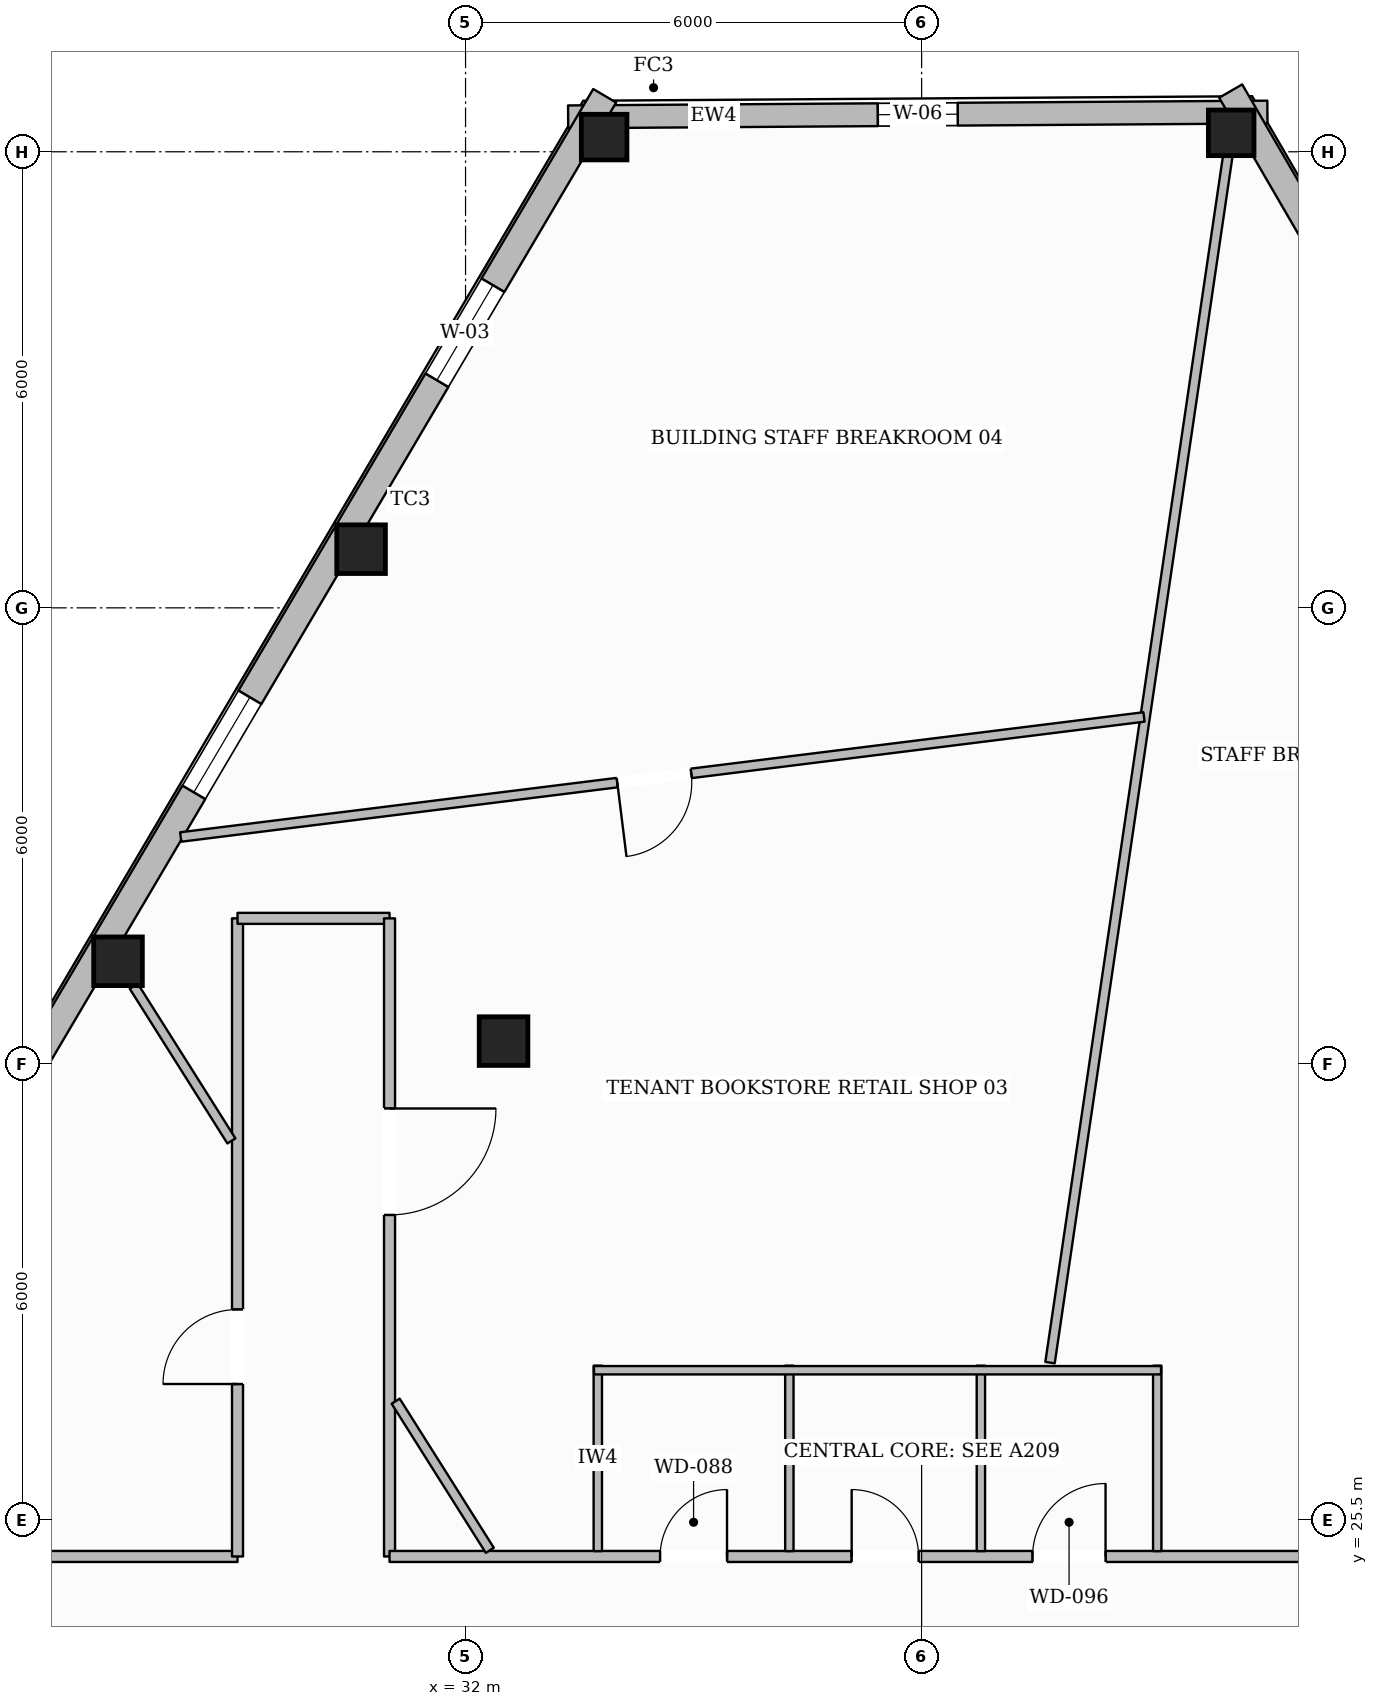
"""IFC4 building model, lengths in metres.
Left out: names, types, materials, properties, quantities, classifications, styles, units other than length and angle.
Written with IfcOpenShell. Run it as: python <this file> out.ifc"""

import sys

from ifc_helpers import new_model, si_unit, direction, frame, frame_2d, origin, origin_2d, place, context, subcontext, project, spatial, rectangle, hollow_rectangle, extrude, element, fill, save


model = new_model("IFC4")
c1 = context("Model", 3, precision=1e-05, world=origin(), true_north=direction((0.0, 1.0)))
c2 = subcontext(c1, "Body", "Model", "MODEL_VIEW")
j1 = project(units=[si_unit("LENGTHUNIT", "METRE"), si_unit("PLANEANGLEUNIT", "RADIAN")], contexts=[c1])
p1 = place(None, origin())
s1 = spatial("IfcSite", under=j1, at=p1, CompositionType="ELEMENT")
p2 = place(p1, origin())
s2 = spatial("IfcBuilding", under=s1, at=p2, CompositionType="ELEMENT")
p3 = place(p2, frame((0.0, 0.0, 211.2)))
s3 = spatial("IfcBuildingStorey", under=s2, at=p3, CompositionType="ELEMENT", Elevation=211.2)
p4 = place(p3, frame((33.823, 43.693, 0.0), z_axis=(0.0, 0.0, 1.0), x_axis=(1.0, 0.0, 0.0)))
e1 = element("IfcColumn", 1, at=p4, inside=s3, PredefinedType="COLUMN", context=c2, shape_type="SweptSolid", body=[
    extrude(hollow_rectangle(XDim=0.6, YDim=0.6, WallThickness=0.028, at=origin_2d()), origin(), (0.0, 0.0, 1.0), 3.6),
])
for number, where, z_axis, x_axis in (
    (2, (30.625, 38.272, 0.0), (0.0, 0.0, 1.0), (1.0, 0.0, 0.0)),
    (3, (27.428, 32.85, 0.0), (0.0, 0.0, 1.0), (1.0, 0.0, 0.0)),
):
    element("IfcColumn", number, at=place(p3, frame(where, z_axis=z_axis, x_axis=x_axis)), inside=s3, PredefinedType="COLUMN", context=c2, shape_type="SweptSolid", body=[
        extrude(hollow_rectangle(XDim=0.64, YDim=0.64, WallThickness=0.028, at=origin_2d()), origin(), (0.0, 0.0, 1.0), 3.6),
    ])
p5 = place(p3, frame((42.073, 43.749, 0.0), z_axis=(0.0, 0.0, 1.0), x_axis=(1.0, 0.0, 0.0)))
e4 = element("IfcColumn", 4, at=p5, inside=s3, PredefinedType="COLUMN", context=c2, shape_type="SweptSolid", body=[
    extrude(hollow_rectangle(XDim=0.6, YDim=0.6, WallThickness=0.028, at=origin_2d()), origin(), (0.0, 0.0, 1.0), 3.6),
])
p6 = place(p3, frame((32.5, 31.8, 0.0), z_axis=(0.0, 0.0, 1.0), x_axis=(1.0, 0.0, 0.0)))
e5 = element("IfcColumn", 5, at=p6, inside=s3, PredefinedType="COLUMN", context=c2, shape_type="SweptSolid", body=[
    extrude(hollow_rectangle(XDim=0.64, YDim=0.64, WallThickness=0.028, at=origin_2d()), origin(), (0.0, 0.0, 1.0), 3.6),
])
p7 = place(p3, frame((33.35, 43.96, 0.0), z_axis=(0.0, 0.0, 1.0), x_axis=(0.99997674426, 0.006819892877, 0.0)))
e6 = element("IfcWall", 6, at=p7, inside=s3, PredefinedType="STANDARD", context=c2, shape_type="SweptSolid", body=[
    extrude(rectangle(XDim=9.2, YDim=0.3, at=frame_2d((4.6, 0.0))), origin(), (0.0, 0.0, 1.0), 3.132),
])
p8 = place(p7, frame((4.075, 0.0, 0.65)))
e7 = element("IfcOpeningElement", 7, at=p8, cuts=e6, PredefinedType="OPENING", context=c2, shape_type="SweptSolid", body=[
    extrude(rectangle(XDim=1.05, YDim=1.7, at=frame_2d((0.525, 0.85))), frame((0.0, 0.16, 0.0), z_axis=(0.0, -1.0, 0.0), x_axis=(1.0, 0.0, 0.0)), (0.0, 0.0, 1.0), 0.32),
])
p9 = place(p3, frame((14.16, 10.888, 0.0), z_axis=(0.0, 0.0, 1.0), x_axis=(0.508058913236, 0.861322321017, 0.0)))
e8 = element("IfcWall", 8, at=p9, inside=s3, PredefinedType="STANDARD", context=c2, shape_type="SweptSolid", body=[
    extrude(rectangle(XDim=38.718, YDim=0.35, at=frame_2d((19.359, 0.0))), origin(), (0.0, 0.0, 1.0), 3.132),
])
p10 = place(p9, frame((34.374, 0.0, 0.65)))
e9 = element("IfcOpeningElement", 9, at=p10, cuts=e8, PredefinedType="OPENING", context=c2, shape_type="SweptSolid", body=[
    extrude(rectangle(XDim=1.45, YDim=1.75, at=frame_2d((0.725, 0.875))), frame((0.0, 0.185, 0.0), z_axis=(0.0, -1.0, 0.0), x_axis=(1.0, 0.0, 0.0)), (0.0, 0.0, 1.0), 0.37),
])
p11 = place(p9, frame((28.08, 0.0, 0.65)))
e10 = element("IfcOpeningElement", 10, at=p11, cuts=e8, PredefinedType="OPENING", context=c2, shape_type="SweptSolid", body=[
    extrude(rectangle(XDim=1.45, YDim=1.75, at=frame_2d((0.725, 0.875))), frame((0.0, 0.185, 0.0), z_axis=(0.0, -1.0, 0.0), x_axis=(1.0, 0.0, 0.0)), (0.0, 0.0, 1.0), 0.37),
])
p12 = place(p9, frame((15.491, 0.0, 0.65)))
e11 = element("IfcOpeningElement", 11, at=p12, cuts=e8, PredefinedType="OPENING", context=c2, shape_type="SweptSolid", body=[
    extrude(rectangle(XDim=1.45, YDim=1.75, at=frame_2d((0.725, 0.875))), frame((0.0, 0.185, 0.0), z_axis=(0.0, -1.0, 0.0), x_axis=(1.0, 0.0, 0.0)), (0.0, 0.0, 1.0), 0.37),
])
p13 = place(p9, frame((9.197, 0.0, 0.65)))
e12 = element("IfcOpeningElement", 12, at=p13, cuts=e8, PredefinedType="OPENING", context=c2, shape_type="SweptSolid", body=[
    extrude(rectangle(XDim=1.45, YDim=1.75, at=frame_2d((0.725, 0.875))), frame((0.0, 0.185, 0.0), z_axis=(0.0, -1.0, 0.0), x_axis=(1.0, 0.0, 0.0)), (0.0, 0.0, 1.0), 0.37),
])
p14 = place(p9, frame((2.903, 0.0, 0.65)))
e13 = element("IfcOpeningElement", 13, at=p14, cuts=e8, PredefinedType="OPENING", context=c2, shape_type="SweptSolid", body=[
    extrude(rectangle(XDim=1.45, YDim=1.75, at=frame_2d((0.725, 0.875))), frame((0.0, 0.185, 0.0), z_axis=(0.0, -1.0, 0.0), x_axis=(1.0, 0.0, 0.0)), (0.0, 0.0, 1.0), 0.37),
])
p15 = place(p3, frame((42.066, 44.299, 0.0), z_axis=(0.0, 0.0, 1.0), x_axis=(0.502188775534, -0.864758020331, 0.0)))
e14 = element("IfcWall", 14, at=p15, inside=s3, PredefinedType="STANDARD", context=c2, shape_type="SweptSolid", body=[
    extrude(rectangle(XDim=38.263, YDim=0.35, at=frame_2d((19.132, 0.0))), origin(), (0.0, 0.0, 1.0), 3.132),
])
p16 = place(p15, frame((33.948, 0.0, 0.65)))
e15 = element("IfcOpeningElement", 15, at=p16, cuts=e14, PredefinedType="OPENING", context=c2, shape_type="SweptSolid", body=[
    extrude(rectangle(XDim=1.45, YDim=1.75, at=frame_2d((0.725, 0.875))), frame((0.0, 0.185, 0.0), z_axis=(0.0, -1.0, 0.0), x_axis=(1.0, 0.0, 0.0)), (0.0, 0.0, 1.0), 0.37),
])
p17 = place(p15, frame((27.731, 0.0, 0.65)))
e16 = element("IfcOpeningElement", 16, at=p17, cuts=e14, PredefinedType="OPENING", context=c2, shape_type="SweptSolid", body=[
    extrude(rectangle(XDim=1.45, YDim=1.75, at=frame_2d((0.725, 0.875))), frame((0.0, 0.185, 0.0), z_axis=(0.0, -1.0, 0.0), x_axis=(1.0, 0.0, 0.0)), (0.0, 0.0, 1.0), 0.37),
])
p18 = place(p15, frame((15.297, 0.0, 0.65)))
e17 = element("IfcOpeningElement", 17, at=p18, cuts=e14, PredefinedType="OPENING", context=c2, shape_type="SweptSolid", body=[
    extrude(rectangle(XDim=1.45, YDim=1.75, at=frame_2d((0.725, 0.875))), frame((0.0, 0.185, 0.0), z_axis=(0.0, -1.0, 0.0), x_axis=(1.0, 0.0, 0.0)), (0.0, 0.0, 1.0), 0.37),
])
p19 = place(p15, frame((9.079, 0.0, 0.65)))
e18 = element("IfcOpeningElement", 18, at=p19, cuts=e14, PredefinedType="OPENING", context=c2, shape_type="SweptSolid", body=[
    extrude(rectangle(XDim=1.45, YDim=1.75, at=frame_2d((0.725, 0.875))), frame((0.0, 0.185, 0.0), z_axis=(0.0, -1.0, 0.0), x_axis=(1.0, 0.0, 0.0)), (0.0, 0.0, 1.0), 0.37),
])
p20 = place(p15, frame((2.862, 0.0, 0.65)))
e19 = element("IfcOpeningElement", 19, at=p20, cuts=e14, PredefinedType="OPENING", context=c2, shape_type="SweptSolid", body=[
    extrude(rectangle(XDim=1.45, YDim=1.75, at=frame_2d((0.725, 0.875))), frame((0.0, 0.185, 0.0), z_axis=(0.0, -1.0, 0.0), x_axis=(1.0, 0.0, 0.0)), (0.0, 0.0, 1.0), 0.37),
])
p21 = place(p3, frame((26.06, 25.02, 0.0), z_axis=(0.0, 0.0, 1.0), x_axis=(1.0, 0.0, 0.0)))
e20 = element("IfcWall", 20, at=p21, inside=s3, PredefinedType="PARTITIONING", context=c2, shape_type="SweptSolid", body=[
    extrude(rectangle(XDim=2.94, YDim=0.145, at=frame_2d((1.47, 0.0))), origin(), (0.0, 0.0, 1.0), 3.6),
])
p22 = place(p3, frame((29.0, 25.02, 0.0), z_axis=(0.0, 0.0, 1.0), x_axis=(0.0, 1.0, 0.0)))
e21 = element("IfcWall", 21, at=p22, inside=s3, PredefinedType="PARTITIONING", context=c2, shape_type="SweptSolid", body=[
    extrude(rectangle(XDim=8.395, YDim=0.145, at=frame_2d((4.197, 0.0))), origin(), (0.0, 0.0, 1.0), 3.6),
])
p23 = place(p22, frame((2.269, 0.0, 0.0)))
e22 = element("IfcOpeningElement", 22, at=p23, cuts=e21, PredefinedType="OPENING", context=c2, shape_type="SweptSolid", body=[
    extrude(rectangle(XDim=0.98, YDim=2.15, at=frame_2d((0.49, 1.075))), frame((0.0, 0.083, 0.0), z_axis=(0.0, -1.0, 0.0), x_axis=(1.0, 0.0, 0.0)), (0.0, 0.0, 1.0), 0.165),
])
p24 = place(p3, frame((29.0, 33.415, 0.0), z_axis=(0.0, 0.0, 1.0), x_axis=(1.0, 0.0, 0.0)))
e23 = element("IfcWall", 23, at=p24, inside=s3, PredefinedType="PARTITIONING", context=c2, shape_type="SweptSolid", body=[
    extrude(rectangle(XDim=2.0, YDim=0.145, at=frame_2d((1.0, 0.0))), origin(), (0.0, 0.0, 1.0), 3.6),
])
p25 = place(p3, frame((31.0, 33.415, 0.0), z_axis=(0.0, 0.0, 1.0), x_axis=(0.0, -1.0, 0.0)))
e24 = element("IfcWall", 24, at=p25, inside=s3, PredefinedType="PARTITIONING", context=c2, shape_type="SweptSolid", body=[
    extrude(rectangle(XDim=8.395, YDim=0.145, at=frame_2d((4.197, 0.0))), origin(), (0.0, 0.0, 1.0), 3.6),
])
p26 = place(p25, frame((2.501, 0.0, 0.0)))
e25 = element("IfcOpeningElement", 25, at=p26, cuts=e24, PredefinedType="OPENING", context=c2, shape_type="SweptSolid", body=[
    extrude(rectangle(XDim=1.4, YDim=2.2, at=frame_2d((0.7, 1.1))), frame((0.0, 0.083, 0.0), z_axis=(0.0, -1.0, 0.0), x_axis=(1.0, 0.0, 0.0)), (0.0, 0.0, 1.0), 0.165),
])
p27 = place(p3, frame((31.0, 25.02, 0.0), z_axis=(0.0, 0.0, 1.0), x_axis=(1.0, 0.0, 0.0)))
e26 = element("IfcWall", 26, at=p27, inside=s3, PredefinedType="PARTITIONING", context=c2, shape_type="SweptSolid", body=[
    extrude(rectangle(XDim=14.0, YDim=0.145, at=frame_2d((7.0, 0.0))), origin(), (0.0, 0.0, 1.0), 3.6),
])
p28 = place(p27, frame((3.56, 0.0, 0.0)))
e27 = element("IfcOpeningElement", 27, at=p28, cuts=e26, PredefinedType="OPENING", context=c2, shape_type="SweptSolid", body=[
    extrude(rectangle(XDim=0.88, YDim=2.1, at=frame_2d((0.44, 1.05))), frame((0.0, 0.083, 0.0), z_axis=(0.0, -1.0, 0.0), x_axis=(1.0, 0.0, 0.0)), (0.0, 0.0, 1.0), 0.165),
])
p29 = place(p27, frame((6.08, 0.0, 0.0)))
e28 = element("IfcOpeningElement", 28, at=p29, cuts=e26, PredefinedType="OPENING", context=c2, shape_type="SweptSolid", body=[
    extrude(rectangle(XDim=0.88, YDim=2.1, at=frame_2d((0.44, 1.05))), frame((0.0, 0.083, 0.0), z_axis=(0.0, -1.0, 0.0), x_axis=(1.0, 0.0, 0.0)), (0.0, 0.0, 1.0), 0.165),
])
p30 = place(p27, frame((8.46, 0.0, 0.0)))
e29 = element("IfcOpeningElement", 29, at=p30, cuts=e26, PredefinedType="OPENING", context=c2, shape_type="SweptSolid", body=[
    extrude(rectangle(XDim=0.96, YDim=2.1, at=frame_2d((0.48, 1.05))), frame((0.0, 0.083, 0.0), z_axis=(0.0, -1.0, 0.0), x_axis=(1.0, 0.0, 0.0)), (0.0, 0.0, 1.0), 0.165),
])
p31 = place(p3, frame((33.74, 25.09, 0.0), z_axis=(0.0, 0.0, 1.0), x_axis=(0.0, 1.0, 0.0)))
e30 = element("IfcWall", 30, at=p31, inside=s3, PredefinedType="PLUMBINGWALL", context=c2, shape_type="SweptSolid", body=[
    extrude(rectangle(XDim=2.44, YDim=0.11, at=frame_2d((1.22, 0.0))), origin(), (0.0, 0.0, 1.0), 3.141),
])
for number, where, z_axis, x_axis in (
    (31, (36.26, 25.09, 0.0), (0.0, 0.0, 1.0), (0.0, 1.0, 0.0)),
    (32, (38.78, 25.09, 0.0), (0.0, 0.0, 1.0), (0.0, 1.0, 0.0)),
    (33, (41.1, 25.09, 0.0), (0.0, 0.0, 1.0), (0.0, 1.0, 0.0)),
):
    element("IfcWall", number, at=place(p3, frame(where, z_axis=z_axis, x_axis=x_axis)), inside=s3, PredefinedType="PLUMBINGWALL", context=c2, shape_type="SweptSolid", body=[
        extrude(rectangle(XDim=2.44, YDim=0.11, at=frame_2d((1.22, 0.0))), origin(), (0.0, 0.0, 1.0), 3.6),
    ])
p32 = place(p3, frame((33.69, 27.47, 0.0), z_axis=(0.0, 0.0, 1.0), x_axis=(1.0, 0.0, 0.0)))
e34 = element("IfcWall", 34, at=p32, inside=s3, PredefinedType="PLUMBINGWALL", context=c2, shape_type="SweptSolid", body=[
    extrude(rectangle(XDim=7.46, YDim=0.11, at=frame_2d((3.73, 0.0))), origin(), (0.0, 0.0, 1.0), 3.6),
])
p33 = place(p3, frame((39.69, 27.57, 0.0), z_axis=(0.0, 0.0, 1.0), x_axis=(0.145732327781, 0.989324056434, 0.0)))
e35 = element("IfcWall", 35, at=p33, inside=s3, PredefinedType="PARTITIONING", context=c2, shape_type="SweptSolid", body=[
    extrude(rectangle(XDim=16.042, YDim=0.125, at=frame_2d((8.021, 0.0))), origin(), (0.0, 0.0, 1.0), 3.141),
])
p34 = place(p3, frame((32.319, 25.101, 0.0), z_axis=(0.0, 0.0, 1.0), x_axis=(-0.533719839568, 0.845661358259, 0.0)))
e36 = element("IfcWall", 36, at=p34, inside=s3, PredefinedType="PARTITIONING", context=c2, shape_type="SweptSolid", body=[
    extrude(rectangle(XDim=2.321, YDim=0.125, at=frame_2d((1.16, 0.0))), origin(), (0.0, 0.0, 1.0), 3.6),
])
p35 = place(p3, frame((28.919, 30.487, 0.0), z_axis=(0.0, 0.0, 1.0), x_axis=(-0.533741092176, 0.845647944787, 0.0)))
e37 = element("IfcWall", 37, at=p35, inside=s3, PredefinedType="PARTITIONING", context=c2, shape_type="SweptSolid", body=[
    extrude(rectangle(XDim=2.407, YDim=0.125, at=frame_2d((1.204, 0.0))), origin(), (0.0, 0.0, 1.0), 3.6),
])
p36 = place(p3, frame((40.926, 36.064, 0.0), z_axis=(0.0, 0.0, 1.0), x_axis=(-0.992323981917, -0.123665334316, 0.0)))
e38 = element("IfcWall", 38, at=p36, inside=s3, PredefinedType="PARTITIONING", context=c2, shape_type="SweptSolid", body=[
    extrude(rectangle(XDim=12.771, YDim=0.125, at=frame_2d((6.386, 0.0))), origin(), (0.0, 0.0, 1.0), 3.6),
])
p37 = place(p36, frame((6.003, 0.0, 0.0)))
e39 = element("IfcOpeningElement", 39, at=p37, cuts=e38, PredefinedType="OPENING", context=c2, shape_type="SweptSolid", body=[
    extrude(rectangle(XDim=0.98, YDim=2.15, at=frame_2d((0.49, 1.075))), frame((0.0, 0.073, 0.0), z_axis=(0.0, -1.0, 0.0), x_axis=(1.0, 0.0, 0.0)), (0.0, 0.0, 1.0), 0.145),
])
p38 = place(p10, origin())
e40 = element("IfcWindow", 40, at=p38, inside=s3, PartitioningType="SINGLE_PANEL", PredefinedType="WINDOW", context=c2, shape_type="SweptSolid", body=[
    extrude(rectangle(XDim=1.45, YDim=1.75, at=frame_2d((0.725, 0.875))), frame((0.0, 0.03, 0.0), z_axis=(0.0, -1.0, 0.0), x_axis=(1.0, 0.0, 0.0)), (0.0, 0.0, 1.0), 0.06),
])
fill(e9, e40)
p39 = place(p11, origin())
e41 = element("IfcWindow", 41, at=p39, inside=s3, PartitioningType="SINGLE_PANEL", PredefinedType="WINDOW", context=c2, shape_type="SweptSolid", body=[
    extrude(rectangle(XDim=1.45, YDim=1.75, at=frame_2d((0.725, 0.875))), frame((0.0, 0.03, 0.0), z_axis=(0.0, -1.0, 0.0), x_axis=(1.0, 0.0, 0.0)), (0.0, 0.0, 1.0), 0.06),
])
fill(e10, e41)
p40 = place(p8, origin())
e42 = element("IfcWindow", 42, at=p40, inside=s3, PartitioningType="SINGLE_PANEL", PredefinedType="WINDOW", context=c2, shape_type="SweptSolid", body=[
    extrude(rectangle(XDim=1.05, YDim=1.7, at=frame_2d((0.525, 0.85))), frame((0.0, 0.03, 0.0), z_axis=(0.0, -1.0, 0.0), x_axis=(1.0, 0.0, 0.0)), (0.0, 0.0, 1.0), 0.06),
])
fill(e7, e42)
p41 = place(p28, origin())
e43 = element("IfcDoor", 43, at=p41, inside=s3, OperationType="SINGLE_SWING_RIGHT", PredefinedType="DOOR", context=c2, shape_type="SweptSolid", body=[
    extrude(rectangle(XDim=0.88, YDim=2.1, at=frame_2d((0.44, 1.05))), frame((0.0, 0.025, 0.0), z_axis=(0.0, -1.0, 0.0), x_axis=(1.0, 0.0, 0.0)), (0.0, 0.0, 1.0), 0.05),
])
fill(e27, e43)
p42 = place(p29, origin())
e44 = element("IfcDoor", 44, at=p42, inside=s3, OperationType="SINGLE_SWING_LEFT", PredefinedType="DOOR", context=c2, shape_type="SweptSolid", body=[
    extrude(rectangle(XDim=0.88, YDim=2.1, at=frame_2d((0.44, 1.05))), frame((0.0, 0.025, 0.0), z_axis=(0.0, -1.0, 0.0), x_axis=(1.0, 0.0, 0.0)), (0.0, 0.0, 1.0), 0.05),
])
fill(e28, e44)
p43 = place(p30, origin())
e45 = element("IfcDoor", 45, at=p43, inside=s3, OperationType="SINGLE_SWING_RIGHT", PredefinedType="DOOR", context=c2, shape_type="SweptSolid", body=[
    extrude(rectangle(XDim=0.96, YDim=2.1, at=frame_2d((0.48, 1.05))), frame((0.0, 0.025, 0.0), z_axis=(0.0, -1.0, 0.0), x_axis=(1.0, 0.0, 0.0)), (0.0, 0.0, 1.0), 0.05),
])
fill(e29, e45)
p44 = place(p26, origin())
e46 = element("IfcDoor", 46, at=p44, inside=s3, OperationType="SINGLE_SWING_LEFT", PredefinedType="DOOR", context=c2, shape_type="SweptSolid", body=[
    extrude(rectangle(XDim=1.4, YDim=2.2, at=frame_2d((0.7, 1.1))), frame((0.0, 0.025, 0.0), z_axis=(0.0, -1.0, 0.0), x_axis=(1.0, 0.0, 0.0)), (0.0, 0.0, 1.0), 0.05),
])
fill(e25, e46)
p45 = place(p37, origin())
e47 = element("IfcDoor", 47, at=p45, inside=s3, OperationType="SINGLE_SWING_RIGHT", PredefinedType="DOOR", context=c2, shape_type="SweptSolid", body=[
    extrude(rectangle(XDim=0.98, YDim=2.15, at=frame_2d((0.49, 1.075))), frame((0.0, 0.025, 0.0), z_axis=(0.0, -1.0, 0.0), x_axis=(1.0, 0.0, 0.0)), (0.0, 0.0, 1.0), 0.05),
])
fill(e39, e47)
p46 = place(p23, origin())
e48 = element("IfcDoor", 48, at=p46, inside=s3, OperationType="SINGLE_SWING_LEFT", PredefinedType="DOOR", context=c2, shape_type="SweptSolid", body=[
    extrude(rectangle(XDim=0.98, YDim=2.15, at=frame_2d((0.49, 1.075))), frame((0.0, 0.025, 0.0), z_axis=(0.0, -1.0, 0.0), x_axis=(1.0, 0.0, 0.0)), (0.0, 0.0, 1.0), 0.05),
])
fill(e22, e48)
save(model, sys.argv[1])
